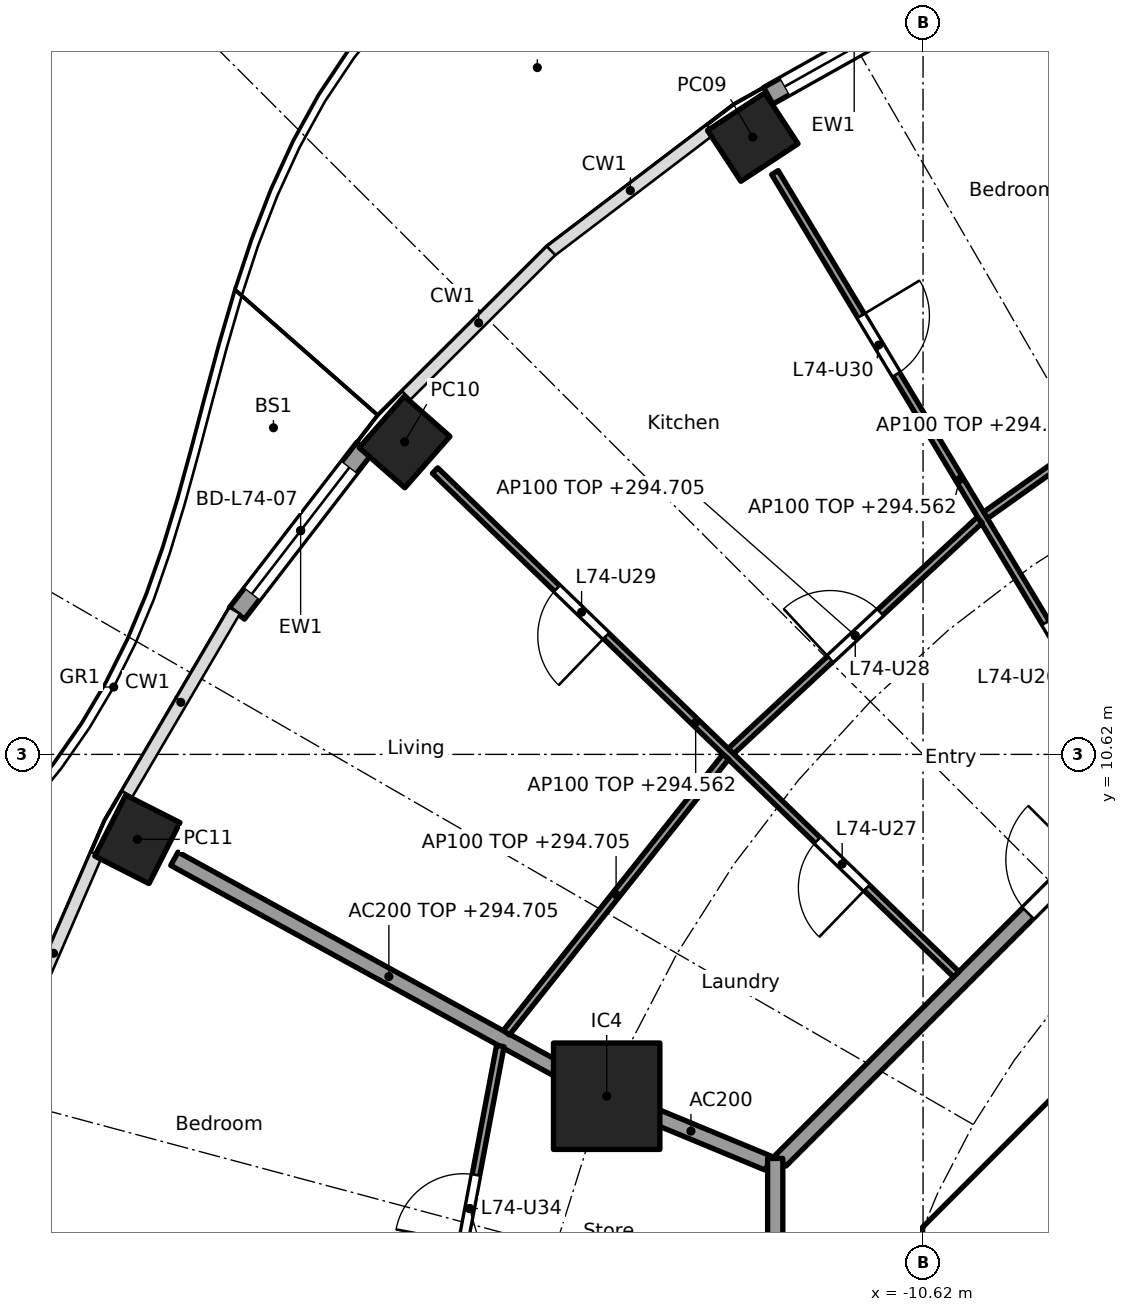
"""IFC4 building model, lengths in metres.
Left out: names, types, materials, properties, quantities, classifications, styles, units other than length and angle.
Written with IfcOpenShell. Run it as: python <this file> out.ifc"""

import sys

from ifc_helpers import new_model, si_unit, direction, frame, frame_2d, origin, origin_2d, place, context, subcontext, project, spatial, polyline, rectangle, hollow_rectangle, outline, extrude, element, fill, save


model = new_model("IFC4")
c1 = context("Model", 3, precision=1e-05, world=origin(), true_north=direction((0.0, 1.0)))
c2 = subcontext(c1, "Body", "Model", "MODEL_VIEW")
j1 = project(units=[si_unit("LENGTHUNIT", "METRE"), si_unit("PLANEANGLEUNIT", "RADIAN")], contexts=[c1])
p1 = place(None, origin())
s1 = spatial("IfcSite", under=j1, at=p1, CompositionType="ELEMENT")
p2 = place(p1, origin())
s2 = spatial("IfcBuilding", under=s1, at=p2, CompositionType="ELEMENT")
p3 = place(p2, frame((0.0, 0.0, 291.8)))
s3 = spatial("IfcBuildingStorey", under=s2, at=p3, CompositionType="ELEMENT", Elevation=291.8)
for number, where, z_axis, x_axis in (
    (1, (-12.86, 18.741, 0.0), (0.0, 0.0, 1.0), (-0.836, -0.549, 0.0)),
    (2, (-17.441, 14.73, 0.0), (0.0, 0.0, 1.0), (-0.66, -0.751, 0.0)),
    (3, (-20.957, 9.502, 0.0), (0.0, 0.0, 1.0), (-0.452, -0.892, 0.0)),
):
    element("IfcColumn", number, at=place(p3, frame(where, z_axis=z_axis, x_axis=x_axis)), inside=s3, PredefinedType="COLUMN", context=c2, shape_type="SweptSolid", body=[
        extrude(hollow_rectangle(XDim=0.9, YDim=0.8, WallThickness=0.028, at=origin_2d()), origin(), (0.0, 0.0, 1.0), 3.7),
    ])
p4 = place(p3, frame((-14.782, 6.123, 0.0), z_axis=(0.0, 0.0, 1.0), x_axis=(1.0, 0.0, 0.0)))
e4 = element("IfcColumn", 4, at=p4, inside=s3, PredefinedType="COLUMN", context=c2, shape_type="SweptSolid", body=[
    extrude(rectangle(XDim=1.4, YDim=1.4, at=origin_2d()), origin(), (0.0, 0.0, 1.0), 3.7),
])
p5 = place(p3, frame((-12.656, 19.285, 0.0), z_axis=(0.0, 0.0, 1.0), x_axis=(0.872075426507, 0.489371485154, 0.0)))
e5 = element("IfcWall", 5, at=p5, inside=s3, PredefinedType="SOLIDWALL", context=c2, shape_type="SweptSolid", body=[
    extrude(rectangle(XDim=2.593, YDim=0.25, at=frame_2d((1.297, 0.0))), origin(), (0.0, 0.0, 1.0), 3.44),
])
p6 = place(p5, frame((0.247, 0.0, 0.0)))
e6 = element("IfcOpeningElement", 6, at=p6, cuts=e5, PredefinedType="OPENING", context=c2, shape_type="SweptSolid", body=[
    extrude(rectangle(XDim=2.1, YDim=2.4, at=frame_2d((1.05, 1.2))), frame((0.0, 0.135, 0.0), z_axis=(0.0, -1.0, 0.0), x_axis=(1.0, 0.0, 0.0)), (0.0, 0.0, 1.0), 0.27),
])
p7 = place(p3, frame((-19.647, 12.476, 0.0), z_axis=(0.0, 0.0, 1.0), x_axis=(0.610475325435, 0.79203527512, 0.0)))
e7 = element("IfcWall", 7, at=p7, inside=s3, PredefinedType="SOLIDWALL", context=c2, shape_type="SweptSolid", body=[
    extrude(rectangle(XDim=2.746, YDim=0.25, at=frame_2d((1.373, 0.0))), origin(), (0.0, 0.0, 1.0), 3.44),
])
p8 = place(p7, frame((0.323, 0.0, 0.0)))
e8 = element("IfcOpeningElement", 8, at=p8, cuts=e7, PredefinedType="OPENING", context=c2, shape_type="SweptSolid", body=[
    extrude(rectangle(XDim=2.1, YDim=2.4, at=frame_2d((1.05, 1.2))), frame((0.0, 0.135, 0.0), z_axis=(0.0, -1.0, 0.0), x_axis=(1.0, 0.0, 0.0)), (0.0, 0.0, 1.0), 0.27),
])
p9 = place(p3, frame((-4.613, 9.988, 0.0), z_axis=(0.0, 0.0, 1.0), x_axis=(-0.707106781187, -0.707106781187, 0.0)))
e9 = element("IfcWall", 9, at=p9, inside=s3, PredefinedType="SHEAR", context=c2, shape_type="SweptSolid", body=[
    extrude(rectangle(XDim=7.602, YDim=0.6, at=frame_2d((3.801, 0.0))), origin(), (0.0, 0.0, 1.0), 3.44),
])
p10 = place(p9, frame((0.351, 0.0, 0.0)))
e10 = element("IfcOpeningElement", 10, at=p10, cuts=e9, PredefinedType="OPENING", context=c2, shape_type="SweptSolid", body=[
    extrude(rectangle(XDim=1.1, YDim=2.1, at=frame_2d((0.55, 1.05))), frame((0.0, 0.31, 0.0), z_axis=(0.0, -1.0, 0.0), x_axis=(1.0, 0.0, 0.0)), (0.0, 0.0, 1.0), 0.62),
])
p11 = place(p3, origin())
e11 = element("IfcWall", 11, at=p11, inside=s3, PredefinedType="SHEAR", context=c2, shape_type="SweptSolid", body=[
    extrude(outline(polyline([(-10.2, 4.825), (-9.776, 4.401), (-10.025, 4.152), (-10.025, 3.801), (-10.625, 3.801), (-10.625, 4.401), (-10.2, 4.825)])), origin(), (0.0, 0.0, 1.0), 3.44),
])
p12 = place(p3, frame((-12.657, 5.243, 0.0), z_axis=(0.0, 0.0, 1.0), x_axis=(-0.923869415315, 0.382707856524, 0.0)))
e12 = element("IfcWall", 12, at=p12, inside=s3, PredefinedType="PARTITIONING", context=c2, shape_type="SweptSolid", body=[
    extrude(rectangle(XDim=2.2, YDim=0.2, at=frame_2d((1.1, 0.0))), origin(), (0.0, 0.0, 1.0), 3.44),
])
p13 = place(p3, frame((-14.826, 6.147, 0.0), z_axis=(0.0, 0.0, 1.0), x_axis=(-0.876484755865, 0.481429613481, 0.0)))
e13 = element("IfcWall", 13, at=p13, inside=s3, PredefinedType="PARTITIONING", context=c2, shape_type="SweptSolid", body=[
    extrude(rectangle(XDim=6.439, YDim=0.2, at=frame_2d((3.219, 0.0))), origin(), (0.0, 0.0, 1.0), 2.905),
])
p14 = place(p3, frame((-5.275, 12.494, 0.0), z_axis=(0.0, 0.0, 1.0), x_axis=(-0.707106781187, -0.707106781187, 0.0)))
e14 = element("IfcWall", 14, at=p14, inside=s3, PredefinedType="PARTITIONING", context=c2, shape_type="SweptSolid", body=[
    extrude(rectangle(XDim=10.209, YDim=0.2, at=frame_2d((5.104, 0.0))), origin(), (0.0, 0.0, 1.0), 3.44),
])
p15 = place(p14, frame((4.604, 0.0, 0.0)))
e15 = element("IfcOpeningElement", 15, at=p15, cuts=e14, PredefinedType="OPENING", context=c2, shape_type="SweptSolid", body=[
    extrude(rectangle(XDim=1.0, YDim=2.1, at=frame_2d((0.5, 1.05))), frame((0.0, 0.11, 0.0), z_axis=(0.0, -1.0, 0.0), x_axis=(1.0, 0.0, 0.0)), (0.0, 0.0, 1.0), 0.22),
])
p16 = place(p3, frame((-12.565, 5.304, 0.0), z_axis=(0.0, 0.0, 1.0), x_axis=(0.0, -1.0, 0.0)))
e16 = element("IfcWall", 16, at=p16, inside=s3, PredefinedType="PARTITIONING", context=c2, shape_type="SweptSolid", body=[
    extrude(rectangle(XDim=10.409, YDim=0.2, at=frame_2d((5.205, 0.0))), origin(), (0.0, 0.0, 1.0), 3.44),
])
p17 = place(p16, frame((4.804, 0.0, 0.0)))
e17 = element("IfcOpeningElement", 17, at=p17, cuts=e16, PredefinedType="OPENING", context=c2, shape_type="SweptSolid", body=[
    extrude(rectangle(XDim=1.0, YDim=2.1, at=frame_2d((0.5, 1.05))), frame((0.0, 0.11, 0.0), z_axis=(0.0, -1.0, 0.0), x_axis=(1.0, 0.0, 0.0)), (0.0, 0.0, 1.0), 0.22),
])
p18 = place(p3, frame((-6.508, 16.103, 0.0), z_axis=(0.0, 0.0, 1.0), x_axis=(-0.815202203556, -0.579176456114, 0.0)))
e18 = element("IfcWall", 18, at=p18, inside=s3, PredefinedType="PARTITIONING", context=c2, shape_type="SweptSolid", body=[
    extrude(rectangle(XDim=4.036, YDim=0.1, at=frame_2d((2.018, 0.0))), origin(), (0.0, 0.0, 1.0), 2.905),
])
p19 = place(p3, frame((-7.709, 10.197, 0.0), z_axis=(0.0, 0.0, 1.0), x_axis=(-0.515516160663, 0.856879856278, 0.0)))
e19 = element("IfcWall", 19, at=p19, inside=s3, PredefinedType="PARTITIONING", context=c2, shape_type="SweptSolid", body=[
    extrude(rectangle(XDim=9.426, YDim=0.1, at=frame_2d((4.713, 0.0))), origin(), (0.0, 0.0, 1.0), 2.762),
])
p20 = place(p19, frame((1.615, 0.0, 0.0)))
e20 = element("IfcOpeningElement", 20, at=p20, cuts=e19, PredefinedType="OPENING", context=c2, shape_type="SweptSolid", body=[
    extrude(rectangle(XDim=0.9, YDim=2.1, at=frame_2d((0.45, 1.05))), frame((0.0, 0.06, 0.0), z_axis=(0.0, -1.0, 0.0), x_axis=(1.0, 0.0, 0.0)), (0.0, 0.0, 1.0), 0.12),
])
p21 = place(p19, frame((6.328, 0.0, 0.0)))
e21 = element("IfcOpeningElement", 21, at=p21, cuts=e19, PredefinedType="OPENING", context=c2, shape_type="SweptSolid", body=[
    extrude(rectangle(XDim=0.9, YDim=2.1, at=frame_2d((0.45, 1.05))), frame((0.0, 0.06, 0.0), z_axis=(0.0, -1.0, 0.0), x_axis=(1.0, 0.0, 0.0)), (0.0, 0.0, 1.0), 0.12),
])
p22 = place(p3, frame((-9.875, 13.702, 0.0), z_axis=(0.0, 0.0, 1.0), x_axis=(-0.732618266441, -0.680639754699, 0.0)))
e22 = element("IfcWall", 22, at=p22, inside=s3, PredefinedType="PARTITIONING", context=c2, shape_type="SweptSolid", body=[
    extrude(rectangle(XDim=4.467, YDim=0.1, at=frame_2d((2.233, 0.0))), origin(), (0.0, 0.0, 1.0), 2.905),
])
p23 = place(p22, frame((1.783, 0.0, 0.0)))
e23 = element("IfcOpeningElement", 23, at=p23, cuts=e22, PredefinedType="OPENING", context=c2, shape_type="SweptSolid", body=[
    extrude(rectangle(XDim=0.9, YDim=2.1, at=frame_2d((0.45, 1.05))), frame((0.0, 0.06, 0.0), z_axis=(0.0, -1.0, 0.0), x_axis=(1.0, 0.0, 0.0)), (0.0, 0.0, 1.0), 0.12),
])
p24 = place(p3, frame((-10.183, 7.727, 0.0), z_axis=(0.0, 0.0, 1.0), x_axis=(-0.719063433856, 0.694944442449, 0.0)))
e24 = element("IfcWall", 24, at=p24, inside=s3, PredefinedType="PARTITIONING", context=c2, shape_type="SweptSolid", body=[
    extrude(rectangle(XDim=9.535, YDim=0.1, at=frame_2d((4.768, 0.0))), origin(), (0.0, 0.0, 1.0), 2.762),
])
p25 = place(p24, frame((1.637, 0.0, 0.0)))
e25 = element("IfcOpeningElement", 25, at=p25, cuts=e24, PredefinedType="OPENING", context=c2, shape_type="SweptSolid", body=[
    extrude(rectangle(XDim=0.9, YDim=2.1, at=frame_2d((0.45, 1.05))), frame((0.0, 0.06, 0.0), z_axis=(0.0, -1.0, 0.0), x_axis=(1.0, 0.0, 0.0)), (0.0, 0.0, 1.0), 0.12),
])
p26 = place(p24, frame((6.405, 0.0, 0.0)))
e26 = element("IfcOpeningElement", 26, at=p26, cuts=e24, PredefinedType="OPENING", context=c2, shape_type="SweptSolid", body=[
    extrude(rectangle(XDim=0.9, YDim=2.1, at=frame_2d((0.45, 1.05))), frame((0.0, 0.06, 0.0), z_axis=(0.0, -1.0, 0.0), x_axis=(1.0, 0.0, 0.0)), (0.0, 0.0, 1.0), 0.12),
])
p27 = place(p3, frame((-13.216, 10.589, 0.0), z_axis=(0.0, 0.0, 1.0), x_axis=(-0.622251572882, -0.782817335045, 0.0)))
e27 = element("IfcWall", 27, at=p27, inside=s3, PredefinedType="PARTITIONING", context=c2, shape_type="SweptSolid", body=[
    extrude(rectangle(XDim=4.636, YDim=0.1, at=frame_2d((2.318, 0.0))), origin(), (0.0, 0.0, 1.0), 2.905),
])
p28 = place(p3, frame((-16.181, 6.783, 0.0), z_axis=(0.0, 0.0, 1.0), x_axis=(-0.185670583745, -0.982612046706, 0.0)))
e28 = element("IfcWall", 28, at=p28, inside=s3, PredefinedType="PARTITIONING", context=c2, shape_type="SweptSolid", body=[
    extrude(rectangle(XDim=4.351, YDim=0.1, at=frame_2d((2.176, 0.0))), origin(), (0.0, 0.0, 1.0), 2.905),
])
p29 = place(p28, frame((1.726, 0.0, 0.0)))
e29 = element("IfcOpeningElement", 29, at=p29, cuts=e28, PredefinedType="OPENING", context=c2, shape_type="SweptSolid", body=[
    extrude(rectangle(XDim=0.9, YDim=2.1, at=frame_2d((0.45, 1.05))), frame((0.0, 0.06, 0.0), z_axis=(0.0, -1.0, 0.0), x_axis=(1.0, 0.0, 0.0)), (0.0, 0.0, 1.0), 0.12),
])
p30 = place(p6, origin())
e30 = element("IfcDoor", 30, at=p30, inside=s3, OperationType="SLIDING_TO_LEFT", PredefinedType="DOOR", context=c2, shape_type="SweptSolid", body=[
    extrude(rectangle(XDim=2.1, YDim=2.4, at=frame_2d((1.05, 1.2))), frame((0.0, 0.025, 0.0), z_axis=(0.0, -1.0, 0.0), x_axis=(1.0, 0.0, 0.0)), (0.0, 0.0, 1.0), 0.05),
])
fill(e6, e30)
p31 = place(p8, origin())
e31 = element("IfcDoor", 31, at=p31, inside=s3, OperationType="SLIDING_TO_LEFT", PredefinedType="DOOR", context=c2, shape_type="SweptSolid", body=[
    extrude(rectangle(XDim=2.1, YDim=2.4, at=frame_2d((1.05, 1.2))), frame((0.0, 0.025, 0.0), z_axis=(0.0, -1.0, 0.0), x_axis=(1.0, 0.0, 0.0)), (0.0, 0.0, 1.0), 0.05),
])
fill(e8, e31)
p32 = place(p15, frame((1.0, 0.0, 0.0), x_axis=(-1.0, 0.0, 0.0)))
e32 = element("IfcDoor", 32, at=p32, inside=s3, OperationType="SINGLE_SWING_RIGHT", PredefinedType="DOOR", context=c2, shape_type="SweptSolid", body=[
    extrude(rectangle(XDim=1.0, YDim=2.1, at=frame_2d((0.5, 1.05))), frame((0.0, 0.025, 0.0), z_axis=(0.0, -1.0, 0.0), x_axis=(1.0, 0.0, 0.0)), (0.0, 0.0, 1.0), 0.05),
])
fill(e15, e32)
p33 = place(p20, frame((0.9, 0.0, 0.0), x_axis=(-1.0, 0.0, 0.0)))
e33 = element("IfcDoor", 33, at=p33, inside=s3, OperationType="SINGLE_SWING_LEFT", PredefinedType="DOOR", context=c2, shape_type="SweptSolid", body=[
    extrude(rectangle(XDim=0.9, YDim=2.1, at=frame_2d((0.45, 1.05))), frame((0.0, 0.025, 0.0), z_axis=(0.0, -1.0, 0.0), x_axis=(1.0, 0.0, 0.0)), (0.0, 0.0, 1.0), 0.05),
])
fill(e20, e33)
p34 = place(p25, origin())
e34 = element("IfcDoor", 34, at=p34, inside=s3, OperationType="SINGLE_SWING_LEFT", PredefinedType="DOOR", context=c2, shape_type="SweptSolid", body=[
    extrude(rectangle(XDim=0.9, YDim=2.1, at=frame_2d((0.45, 1.05))), frame((0.0, 0.025, 0.0), z_axis=(0.0, -1.0, 0.0), x_axis=(1.0, 0.0, 0.0)), (0.0, 0.0, 1.0), 0.05),
])
fill(e25, e34)
p35 = place(p23, frame((0.9, 0.0, 0.0), x_axis=(-1.0, 0.0, 0.0)))
e35 = element("IfcDoor", 35, at=p35, inside=s3, OperationType="SINGLE_SWING_LEFT", PredefinedType="DOOR", context=c2, shape_type="SweptSolid", body=[
    extrude(rectangle(XDim=0.9, YDim=2.1, at=frame_2d((0.45, 1.05))), frame((0.0, 0.025, 0.0), z_axis=(0.0, -1.0, 0.0), x_axis=(1.0, 0.0, 0.0)), (0.0, 0.0, 1.0), 0.05),
])
fill(e23, e35)
p36 = place(p26, origin())
e36 = element("IfcDoor", 36, at=p36, inside=s3, OperationType="SINGLE_SWING_LEFT", PredefinedType="DOOR", context=c2, shape_type="SweptSolid", body=[
    extrude(rectangle(XDim=0.9, YDim=2.1, at=frame_2d((0.45, 1.05))), frame((0.0, 0.025, 0.0), z_axis=(0.0, -1.0, 0.0), x_axis=(1.0, 0.0, 0.0)), (0.0, 0.0, 1.0), 0.05),
])
fill(e26, e36)
p37 = place(p21, frame((0.9, 0.0, 0.0), x_axis=(-1.0, 0.0, 0.0)))
e37 = element("IfcDoor", 37, at=p37, inside=s3, OperationType="SINGLE_SWING_LEFT", PredefinedType="DOOR", context=c2, shape_type="SweptSolid", body=[
    extrude(rectangle(XDim=0.9, YDim=2.1, at=frame_2d((0.45, 1.05))), frame((0.0, 0.025, 0.0), z_axis=(0.0, -1.0, 0.0), x_axis=(1.0, 0.0, 0.0)), (0.0, 0.0, 1.0), 0.05),
])
fill(e21, e37)
p38 = place(p29, frame((0.9, 0.0, 0.0), x_axis=(-1.0, 0.0, 0.0)))
e38 = element("IfcDoor", 38, at=p38, inside=s3, OperationType="SINGLE_SWING_LEFT", PredefinedType="DOOR", context=c2, shape_type="SweptSolid", body=[
    extrude(rectangle(XDim=0.9, YDim=2.1, at=frame_2d((0.45, 1.05))), frame((0.0, 0.025, 0.0), z_axis=(0.0, -1.0, 0.0), x_axis=(1.0, 0.0, 0.0)), (0.0, 0.0, 1.0), 0.05),
])
fill(e29, e38)
save(model, sys.argv[1])
